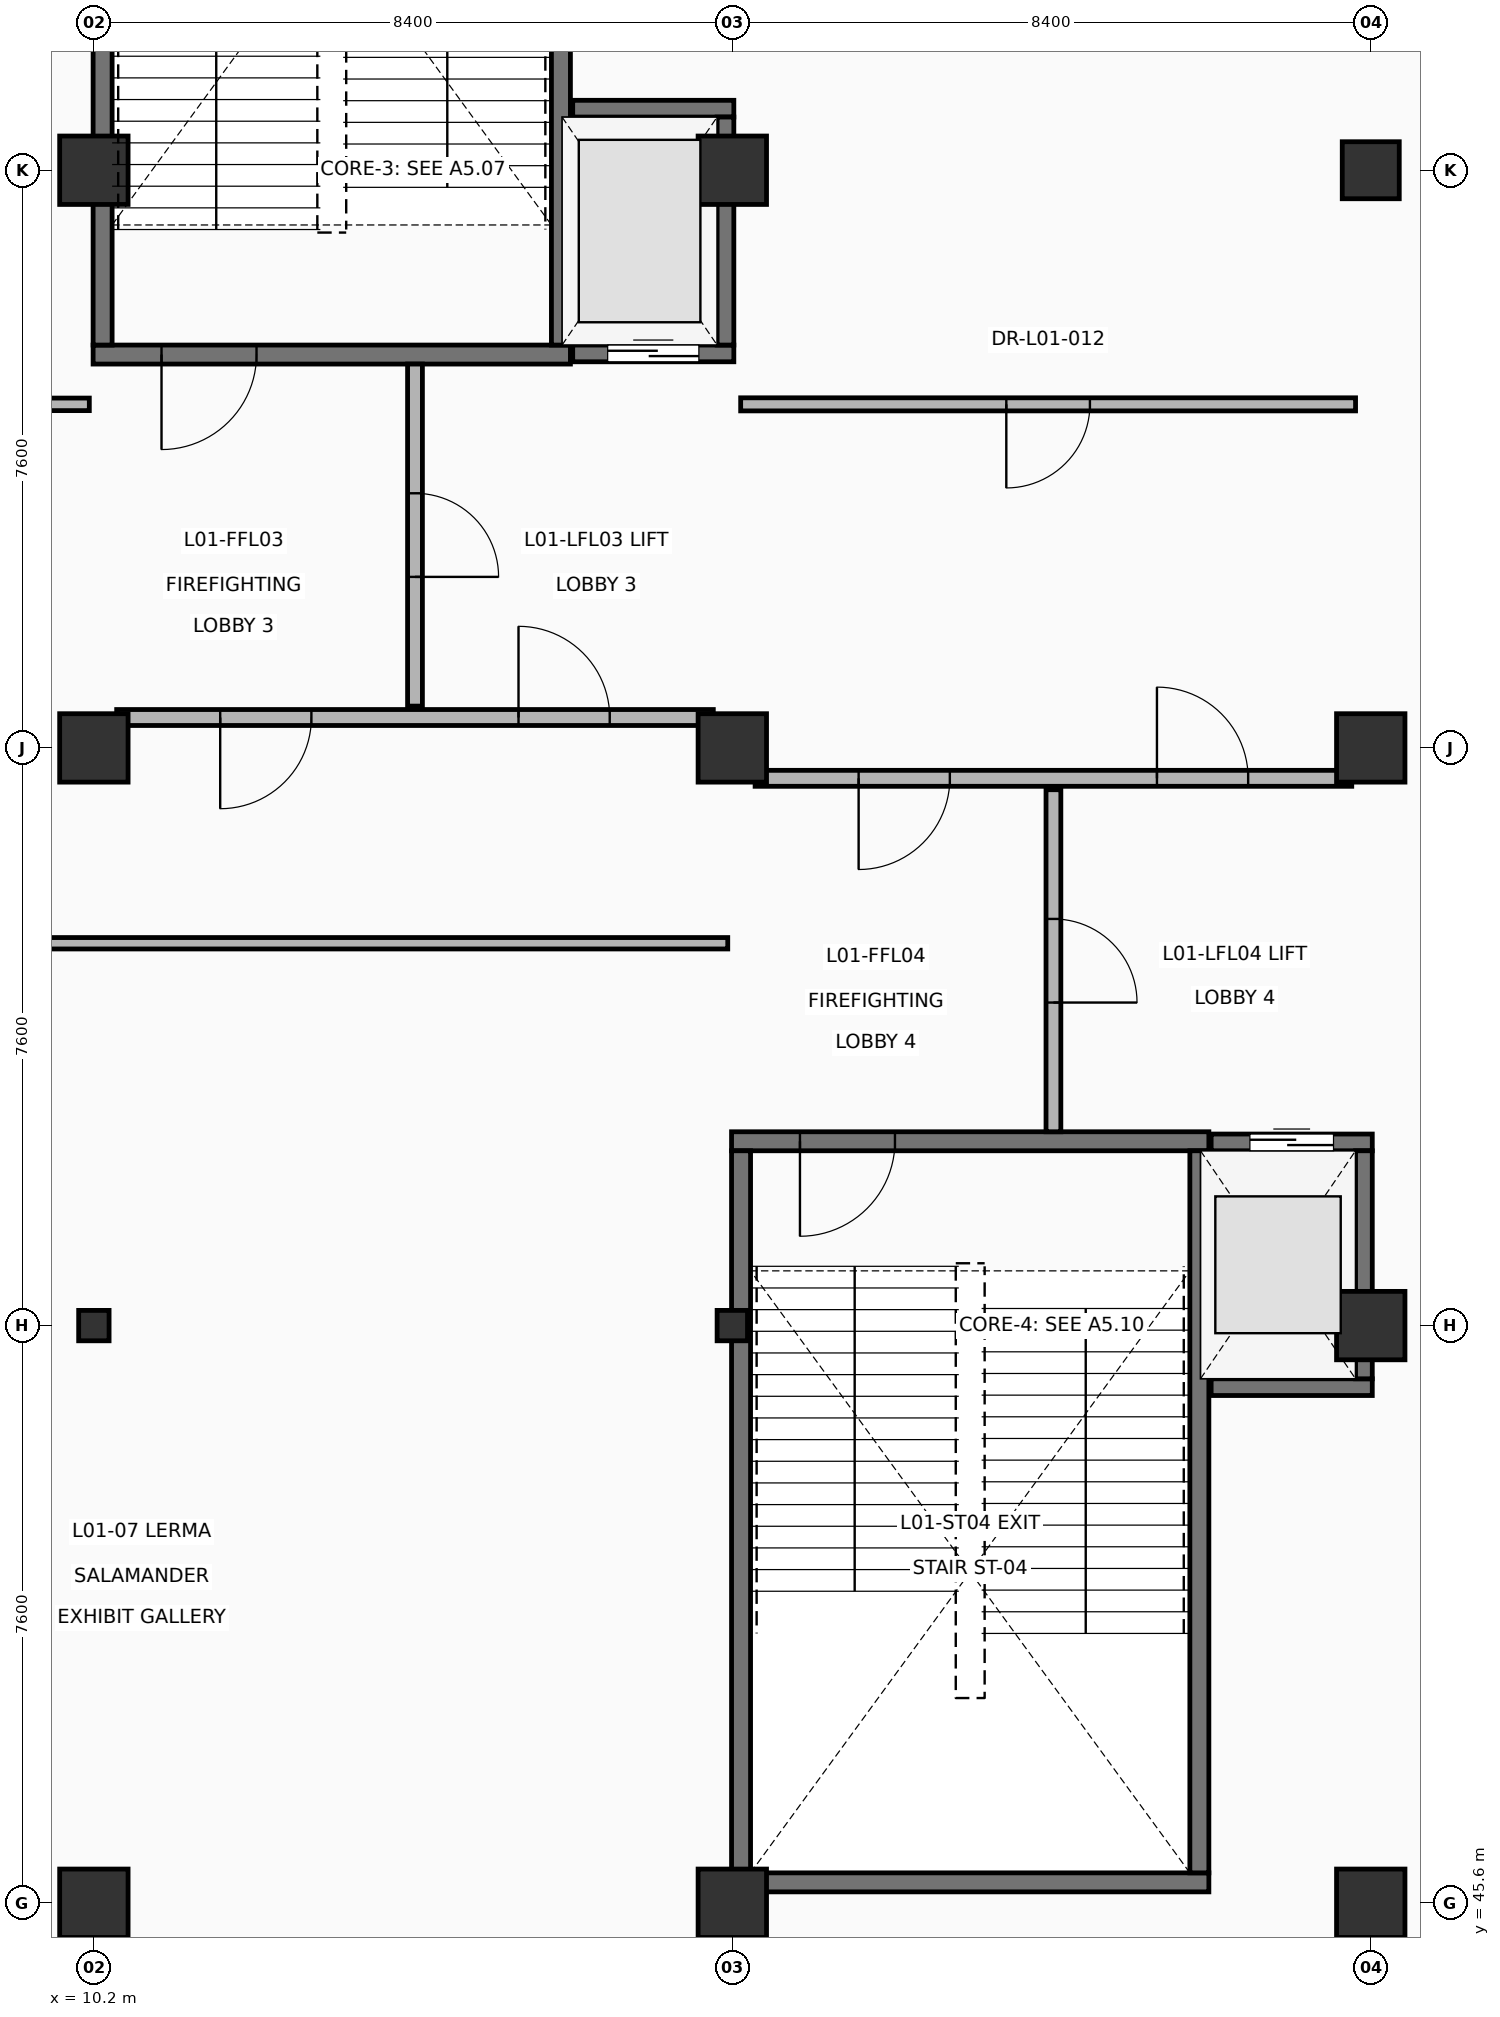
"""IFC4 building model, lengths in metres.
Left out: names, types, materials, properties, quantities, classifications, styles, units other than length and angle.
Written with IfcOpenShell. Run it as: python <this file> out.ifc"""

import sys

from ifc_helpers import new_model, si_unit, direction, frame, frame_2d, origin, origin_2d, place, context, subcontext, project, spatial, rectangle, hollow_rectangle, circle, extrude, element, fill, save


model = new_model("IFC4")
c1 = context("Model", 3, precision=1e-05, world=origin(), true_north=direction((0.0, 1.0)))
c2 = subcontext(c1, "Body", "Model", "MODEL_VIEW")
j1 = project(units=[si_unit("LENGTHUNIT", "METRE"), si_unit("PLANEANGLEUNIT", "RADIAN")], contexts=[c1])
p1 = place(None, origin())
s1 = spatial("IfcSite", under=j1, at=p1, CompositionType="ELEMENT")
p2 = place(p1, origin())
s2 = spatial("IfcBuilding", under=s1, at=p2, CompositionType="ELEMENT")
p3 = place(p2, origin())
s3 = spatial("IfcBuildingStorey", under=s2, at=p3, CompositionType="ELEMENT", Elevation=0.0)
p4 = place(p3, frame((10.2, 45.6, 0.0), z_axis=(0.0, 0.0, 1.0), x_axis=(1.0, 0.0, 0.0)))
e1 = element("IfcColumn", 1, at=p4, inside=s3, PredefinedType="COLUMN", context=c2, shape_type="SweptSolid", body=[
    extrude(rectangle(XDim=0.9, YDim=0.9, at=origin_2d()), origin(), (0.0, 0.0, 1.0), 5.4),
])
p5 = place(p3, frame((10.2, 53.2, 0.0), z_axis=(0.0, 0.0, 1.0), x_axis=(1.0, 0.0, 0.0)))
e2 = element("IfcColumn", 2, at=p5, inside=s3, PredefinedType="COLUMN", context=c2, shape_type="SweptSolid", body=[
    extrude(hollow_rectangle(XDim=0.4, YDim=0.4, WallThickness=0.016, at=origin_2d()), origin(), (0.0, 0.0, 1.0), 5.4),
])
for number, where, z_axis, x_axis in (
    (3, (10.2, 60.8, 0.0), (0.0, 0.0, 1.0), (1.0, 0.0, 0.0)),
    (4, (10.2, 68.4, 0.0), (0.0, 0.0, 1.0), (1.0, 0.0, 0.0)),
    (5, (18.6, 45.6, 0.0), (0.0, 0.0, 1.0), (1.0, 0.0, 0.0)),
):
    element("IfcColumn", number, at=place(p3, frame(where, z_axis=z_axis, x_axis=x_axis)), inside=s3, PredefinedType="COLUMN", context=c2, shape_type="SweptSolid", body=[
        extrude(rectangle(XDim=0.9, YDim=0.9, at=origin_2d()), origin(), (0.0, 0.0, 1.0), 5.4),
    ])
p6 = place(p3, frame((18.6, 53.2, 0.0), z_axis=(0.0, 0.0, 1.0), x_axis=(1.0, 0.0, 0.0)))
e6 = element("IfcColumn", 6, at=p6, inside=s3, PredefinedType="COLUMN", context=c2, shape_type="SweptSolid", body=[
    extrude(hollow_rectangle(XDim=0.4, YDim=0.4, WallThickness=0.016, at=origin_2d()), origin(), (0.0, 0.0, 1.0), 5.4),
])
for number, where, z_axis, x_axis in (
    (7, (18.6, 60.8, 0.0), (0.0, 0.0, 1.0), (1.0, 0.0, 0.0)),
    (8, (18.6, 68.4, 0.0), (0.0, 0.0, 1.0), (1.0, 0.0, 0.0)),
    (9, (27.0, 45.6, 0.0), (0.0, 0.0, 1.0), (1.0, 0.0, 0.0)),
    (10, (27.0, 53.2, 0.0), (0.0, 0.0, 1.0), (1.0, 0.0, 0.0)),
    (11, (27.0, 60.8, 0.0), (0.0, 0.0, 1.0), (1.0, 0.0, 0.0)),
):
    element("IfcColumn", number, at=place(p3, frame(where, z_axis=z_axis, x_axis=x_axis)), inside=s3, PredefinedType="COLUMN", context=c2, shape_type="SweptSolid", body=[
        extrude(rectangle(XDim=0.9, YDim=0.9, at=origin_2d()), origin(), (0.0, 0.0, 1.0), 5.4),
    ])
p7 = place(p3, frame((27.0, 68.4, 0.0), z_axis=(0.0, 0.0, 1.0), x_axis=(1.0, 0.0, 0.0)))
e12 = element("IfcColumn", 12, at=p7, inside=s3, PredefinedType="COLUMN", context=c2, shape_type="SweptSolid", body=[
    extrude(circle(Radius=0.375, at=origin_2d()), origin(), (0.0, 0.0, 1.0), 5.4),
])
p8 = place(p3, frame((10.19, 65.975, 0.0), z_axis=(0.0, 0.0, 1.0), x_axis=(1.0, 0.0, 0.0)))
e13 = element("IfcWall", 13, at=p8, inside=s3, PredefinedType="SHEAR", context=c2, shape_type="SweptSolid", body=[
    extrude(rectangle(XDim=6.28, YDim=0.25, at=frame_2d((3.14, 0.0))), origin(), (0.0, 0.0, 1.0), 5.16),
])
p9 = place(p8, frame((0.9, 0.0, 0.0)))
e14 = element("IfcOpeningElement", 14, at=p9, cuts=e13, PredefinedType="OPENING", context=c2, shape_type="SweptSolid", body=[
    extrude(rectangle(XDim=1.25, YDim=2.2, at=frame_2d((0.625, 1.1))), frame((0.0, 0.135, 0.0), z_axis=(0.0, -1.0, 0.0), x_axis=(1.0, 0.0, 0.0)), (0.0, 0.0, 1.0), 0.27),
])
for number, where, z_axis, x_axis in (
    (15, (10.315, 66.1, 0.0), (0.0, 0.0, 1.0), (0.0, 1.0, 0.0)),
    (16, (16.345, 66.1, 0.0), (0.0, 0.0, 1.0), (0.0, 1.0, 0.0)),
):
    element("IfcWall", number, at=place(p3, frame(where, z_axis=z_axis, x_axis=x_axis)), inside=s3, PredefinedType="SHEAR", context=c2, shape_type="SweptSolid", body=[
        extrude(rectangle(XDim=9.5, YDim=0.25, at=frame_2d((4.75, 0.0))), origin(), (0.0, 0.0, 1.0), 5.16),
    ])
p10 = place(p3, frame((16.5, 65.99, 0.0), z_axis=(0.0, 0.0, 1.0), x_axis=(1.0, 0.0, 0.0)))
e17 = element("IfcWall", 17, at=p10, inside=s3, PredefinedType="SHEAR", context=c2, shape_type="SweptSolid", body=[
    extrude(rectangle(XDim=2.12, YDim=0.22, at=frame_2d((1.06, 0.0))), origin(), (0.0, 0.0, 1.0), 5.16),
])
p11 = place(p10, frame((0.46, 0.0, 0.0)))
e18 = element("IfcOpeningElement", 18, at=p11, cuts=e17, PredefinedType="OPENING", context=c2, shape_type="SweptSolid", body=[
    extrude(rectangle(XDim=1.2, YDim=2.2, at=frame_2d((0.6, 1.1))), frame((0.0, 0.12, 0.0), z_axis=(0.0, -1.0, 0.0), x_axis=(1.0, 0.0, 0.0)), (0.0, 0.0, 1.0), 0.24),
])
p12 = place(p3, frame((16.5, 69.21, 0.0), z_axis=(0.0, 0.0, 1.0), x_axis=(1.0, 0.0, 0.0)))
e19 = element("IfcWall", 19, at=p12, inside=s3, PredefinedType="SHEAR", context=c2, shape_type="SweptSolid", body=[
    extrude(rectangle(XDim=2.12, YDim=0.22, at=frame_2d((1.06, 0.0))), origin(), (0.0, 0.0, 1.0), 5.16),
])
p13 = place(p3, frame((18.51, 66.1, 0.0), z_axis=(0.0, 0.0, 1.0), x_axis=(0.0, 1.0, 0.0)))
e20 = element("IfcWall", 20, at=p13, inside=s3, PredefinedType="SHEAR", context=c2, shape_type="SweptSolid", body=[
    extrude(rectangle(XDim=3.0, YDim=0.22, at=frame_2d((1.5, 0.0))), origin(), (0.0, 0.0, 1.0), 5.16),
])
p14 = place(p3, frame((10.5, 61.2, 0.0), z_axis=(0.0, 0.0, 1.0), x_axis=(1.0, 0.0, 0.0)))
e21 = element("IfcWall", 21, at=p14, inside=s3, PredefinedType="PARTITIONING", context=c2, shape_type="SweptSolid", body=[
    extrude(rectangle(XDim=7.85, YDim=0.21, at=frame_2d((3.925, 0.0))), origin(), (0.0, 0.0, 1.0), 5.16),
])
p15 = place(p14, frame((1.362, 0.0, 0.0)))
e22 = element("IfcOpeningElement", 22, at=p15, cuts=e21, PredefinedType="OPENING", context=c2, shape_type="SweptSolid", body=[
    extrude(rectangle(XDim=1.2, YDim=2.2, at=frame_2d((0.6, 1.1))), frame((0.0, 0.115, 0.0), z_axis=(0.0, -1.0, 0.0), x_axis=(1.0, 0.0, 0.0)), (0.0, 0.0, 1.0), 0.23),
])
p16 = place(p14, frame((5.287, 0.0, 0.0)))
e23 = element("IfcOpeningElement", 23, at=p16, cuts=e21, PredefinedType="OPENING", context=c2, shape_type="SweptSolid", body=[
    extrude(rectangle(XDim=1.2, YDim=2.2, at=frame_2d((0.6, 1.1))), frame((0.0, 0.115, 0.0), z_axis=(0.0, -1.0, 0.0), x_axis=(1.0, 0.0, 0.0)), (0.0, 0.0, 1.0), 0.23),
])
p17 = place(p3, frame((14.425, 61.35, 0.0), z_axis=(0.0, 0.0, 1.0), x_axis=(0.0, 1.0, 0.0)))
e24 = element("IfcWall", 24, at=p17, inside=s3, PredefinedType="PARTITIONING", context=c2, shape_type="SweptSolid", body=[
    extrude(rectangle(XDim=4.5, YDim=0.195, at=frame_2d((2.25, 0.0))), origin(), (0.0, 0.0, 1.0), 5.16),
])
p18 = place(p17, frame((1.7, 0.0, 0.0)))
e25 = element("IfcOpeningElement", 25, at=p18, cuts=e24, PredefinedType="OPENING", context=c2, shape_type="SweptSolid", body=[
    extrude(rectangle(XDim=1.1, YDim=2.15, at=frame_2d((0.55, 1.075))), frame((0.0, 0.107, 0.0), z_axis=(0.0, -1.0, 0.0), x_axis=(1.0, 0.0, 0.0)), (0.0, 0.0, 1.0), 0.215),
])
p19 = place(p3, frame((18.59, 45.875, 0.0), z_axis=(0.0, 0.0, 1.0), x_axis=(1.0, 0.0, 0.0)))
e26 = element("IfcWall", 26, at=p19, inside=s3, PredefinedType="SHEAR", context=c2, shape_type="SweptSolid", body=[
    extrude(rectangle(XDim=6.28, YDim=0.25, at=frame_2d((3.14, 0.0))), origin(), (0.0, 0.0, 1.0), 5.16),
])
p20 = place(p3, frame((18.59, 55.625, 0.0), z_axis=(0.0, 0.0, 1.0), x_axis=(1.0, 0.0, 0.0)))
e27 = element("IfcWall", 27, at=p20, inside=s3, PredefinedType="SHEAR", context=c2, shape_type="SweptSolid", body=[
    extrude(rectangle(XDim=6.28, YDim=0.25, at=frame_2d((3.14, 0.0))), origin(), (0.0, 0.0, 1.0), 5.16),
])
p21 = place(p20, frame((0.9, 0.0, 0.0)))
e28 = element("IfcOpeningElement", 28, at=p21, cuts=e27, PredefinedType="OPENING", context=c2, shape_type="SweptSolid", body=[
    extrude(rectangle(XDim=1.25, YDim=2.2, at=frame_2d((0.625, 1.1))), frame((0.0, 0.135, 0.0), z_axis=(0.0, -1.0, 0.0), x_axis=(1.0, 0.0, 0.0)), (0.0, 0.0, 1.0), 0.27),
])
for number, where, z_axis, x_axis in (
    (29, (18.715, 46.0, 0.0), (0.0, 0.0, 1.0), (0.0, 1.0, 0.0)),
    (30, (24.745, 46.0, 0.0), (0.0, 0.0, 1.0), (0.0, 1.0, 0.0)),
):
    element("IfcWall", number, at=place(p3, frame(where, z_axis=z_axis, x_axis=x_axis)), inside=s3, PredefinedType="SHEAR", context=c2, shape_type="SweptSolid", body=[
        extrude(rectangle(XDim=9.5, YDim=0.25, at=frame_2d((4.75, 0.0))), origin(), (0.0, 0.0, 1.0), 5.16),
    ])
p22 = place(p3, frame((24.9, 52.39, 0.0), z_axis=(0.0, 0.0, 1.0), x_axis=(1.0, 0.0, 0.0)))
e31 = element("IfcWall", 31, at=p22, inside=s3, PredefinedType="SHEAR", context=c2, shape_type="SweptSolid", body=[
    extrude(rectangle(XDim=2.12, YDim=0.22, at=frame_2d((1.06, 0.0))), origin(), (0.0, 0.0, 1.0), 5.16),
])
p23 = place(p3, frame((24.9, 55.61, 0.0), z_axis=(0.0, 0.0, 1.0), x_axis=(1.0, 0.0, 0.0)))
e32 = element("IfcWall", 32, at=p23, inside=s3, PredefinedType="SHEAR", context=c2, shape_type="SweptSolid", body=[
    extrude(rectangle(XDim=2.12, YDim=0.22, at=frame_2d((1.06, 0.0))), origin(), (0.0, 0.0, 1.0), 5.16),
])
p24 = place(p23, frame((0.51, 0.0, 0.0)))
e33 = element("IfcOpeningElement", 33, at=p24, cuts=e32, PredefinedType="OPENING", context=c2, shape_type="SweptSolid", body=[
    extrude(rectangle(XDim=1.1, YDim=2.15, at=frame_2d((0.55, 1.075))), frame((0.0, 0.12, 0.0), z_axis=(0.0, -1.0, 0.0), x_axis=(1.0, 0.0, 0.0)), (0.0, 0.0, 1.0), 0.24),
])
p25 = place(p3, frame((26.91, 52.5, 0.0), z_axis=(0.0, 0.0, 1.0), x_axis=(0.0, 1.0, 0.0)))
e34 = element("IfcWall", 34, at=p25, inside=s3, PredefinedType="SHEAR", context=c2, shape_type="SweptSolid", body=[
    extrude(rectangle(XDim=3.0, YDim=0.22, at=frame_2d((1.5, 0.0))), origin(), (0.0, 0.0, 1.0), 5.16),
])
p26 = place(p3, frame((18.9, 60.4, 0.0), z_axis=(0.0, 0.0, 1.0), x_axis=(1.0, 0.0, 0.0)))
e35 = element("IfcWall", 35, at=p26, inside=s3, PredefinedType="PARTITIONING", context=c2, shape_type="SweptSolid", body=[
    extrude(rectangle(XDim=7.85, YDim=0.21, at=frame_2d((3.925, 0.0))), origin(), (0.0, 0.0, 1.0), 5.16),
])
p27 = place(p26, frame((1.362, 0.0, 0.0)))
e36 = element("IfcOpeningElement", 36, at=p27, cuts=e35, PredefinedType="OPENING", context=c2, shape_type="SweptSolid", body=[
    extrude(rectangle(XDim=1.2, YDim=2.2, at=frame_2d((0.6, 1.1))), frame((0.0, 0.115, 0.0), z_axis=(0.0, -1.0, 0.0), x_axis=(1.0, 0.0, 0.0)), (0.0, 0.0, 1.0), 0.23),
])
p28 = place(p26, frame((5.287, 0.0, 0.0)))
e37 = element("IfcOpeningElement", 37, at=p28, cuts=e35, PredefinedType="OPENING", context=c2, shape_type="SweptSolid", body=[
    extrude(rectangle(XDim=1.2, YDim=2.2, at=frame_2d((0.6, 1.1))), frame((0.0, 0.115, 0.0), z_axis=(0.0, -1.0, 0.0), x_axis=(1.0, 0.0, 0.0)), (0.0, 0.0, 1.0), 0.23),
])
p29 = place(p3, frame((22.825, 55.75, 0.0), z_axis=(0.0, 0.0, 1.0), x_axis=(0.0, 1.0, 0.0)))
e38 = element("IfcWall", 38, at=p29, inside=s3, PredefinedType="PARTITIONING", context=c2, shape_type="SweptSolid", body=[
    extrude(rectangle(XDim=4.5, YDim=0.195, at=frame_2d((2.25, 0.0))), origin(), (0.0, 0.0, 1.0), 5.16),
])
p30 = place(p29, frame((1.7, 0.0, 0.0)))
e39 = element("IfcOpeningElement", 39, at=p30, cuts=e38, PredefinedType="OPENING", context=c2, shape_type="SweptSolid", body=[
    extrude(rectangle(XDim=1.1, YDim=2.15, at=frame_2d((0.55, 1.075))), frame((0.0, 0.107, 0.0), z_axis=(0.0, -1.0, 0.0), x_axis=(1.0, 0.0, 0.0)), (0.0, 0.0, 1.0), 0.215),
])
p31 = place(p3, frame((18.71, 65.32, 0.0), z_axis=(0.0, 0.0, 1.0), x_axis=(1.0, 0.0, 0.0)))
e40 = element("IfcWall", 40, at=p31, inside=s3, PredefinedType="PARTITIONING", context=c2, shape_type="SweptSolid", body=[
    extrude(rectangle(XDim=8.09, YDim=0.172, at=frame_2d((4.045, 0.0))), origin(), (0.0, 0.0, 1.0), 4.462),
])
p32 = place(p31, frame((3.495, 0.0, 0.0)))
e41 = element("IfcOpeningElement", 41, at=p32, cuts=e40, PredefinedType="OPENING", context=c2, shape_type="SweptSolid", body=[
    extrude(rectangle(XDim=1.1, YDim=2.15, at=frame_2d((0.55, 1.075))), frame((0.0, 0.096, 0.0), z_axis=(0.0, -1.0, 0.0), x_axis=(1.0, 0.0, 0.0)), (0.0, 0.0, 1.0), 0.192),
])
p33 = place(p3, frame((3.425, 65.32, 0.0), z_axis=(0.0, 0.0, 1.0), x_axis=(1.0, 0.0, 0.0)))
e42 = element("IfcWall", 42, at=p33, inside=s3, PredefinedType="PARTITIONING", context=c2, shape_type="SweptSolid", body=[
    extrude(rectangle(XDim=6.715, YDim=0.165, at=frame_2d((3.357, 0.0))), origin(), (0.0, 0.0, 1.0), 4.462),
])
p34 = place(p3, frame((18.54, 58.23, 0.0), z_axis=(0.0, 0.0, 1.0), x_axis=(-1.0, 0.0, 0.0)))
e43 = element("IfcWall", 43, at=p34, inside=s3, PredefinedType="PARTITIONING", context=c2, shape_type="SweptSolid", body=[
    extrude(rectangle(XDim=15.1, YDim=0.15, at=frame_2d((7.55, 0.0))), origin(), (0.0, 0.0, 1.0), 4.462),
])
p35 = place(p9, origin())
e44 = element("IfcDoor", 44, at=p35, inside=s3, OperationType="SINGLE_SWING_RIGHT", PredefinedType="DOOR", context=c2, shape_type="SweptSolid", body=[
    extrude(rectangle(XDim=1.25, YDim=2.2, at=frame_2d((0.625, 1.1))), frame((0.0, 0.025, 0.0), z_axis=(0.0, -1.0, 0.0), x_axis=(1.0, 0.0, 0.0)), (0.0, 0.0, 1.0), 0.05),
])
fill(e14, e44)
p36 = place(p11, origin())
e45 = element("IfcDoor", 45, at=p36, inside=s3, OperationType="DOUBLE_DOOR_SLIDING", PredefinedType="DOOR", context=c2, shape_type="SweptSolid", body=[
    extrude(rectangle(XDim=1.2, YDim=2.2, at=frame_2d((0.6, 1.1))), frame((0.0, 0.025, 0.0), z_axis=(0.0, -1.0, 0.0), x_axis=(1.0, 0.0, 0.0)), (0.0, 0.0, 1.0), 0.05),
])
fill(e18, e45)
p37 = place(p15, origin())
e46 = element("IfcDoor", 46, at=p37, inside=s3, OperationType="SINGLE_SWING_RIGHT", PredefinedType="DOOR", context=c2, shape_type="SweptSolid", body=[
    extrude(rectangle(XDim=1.2, YDim=2.2, at=frame_2d((0.6, 1.1))), frame((0.0, 0.025, 0.0), z_axis=(0.0, -1.0, 0.0), x_axis=(1.0, 0.0, 0.0)), (0.0, 0.0, 1.0), 0.05),
])
fill(e22, e46)
p38 = place(p16, origin())
e47 = element("IfcDoor", 47, at=p38, inside=s3, OperationType="SINGLE_SWING_LEFT", PredefinedType="DOOR", context=c2, shape_type="SweptSolid", body=[
    extrude(rectangle(XDim=1.2, YDim=2.2, at=frame_2d((0.6, 1.1))), frame((0.0, 0.025, 0.0), z_axis=(0.0, -1.0, 0.0), x_axis=(1.0, 0.0, 0.0)), (0.0, 0.0, 1.0), 0.05),
])
fill(e23, e47)
p39 = place(p18, origin())
e48 = element("IfcDoor", 48, at=p39, inside=s3, OperationType="SINGLE_SWING_RIGHT", PredefinedType="DOOR", context=c2, shape_type="SweptSolid", body=[
    extrude(rectangle(XDim=1.1, YDim=2.15, at=frame_2d((0.55, 1.075))), frame((0.0, 0.025, 0.0), z_axis=(0.0, -1.0, 0.0), x_axis=(1.0, 0.0, 0.0)), (0.0, 0.0, 1.0), 0.05),
])
fill(e25, e48)
p40 = place(p21, origin())
e49 = element("IfcDoor", 49, at=p40, inside=s3, OperationType="SINGLE_SWING_RIGHT", PredefinedType="DOOR", context=c2, shape_type="SweptSolid", body=[
    extrude(rectangle(XDim=1.25, YDim=2.2, at=frame_2d((0.625, 1.1))), frame((0.0, 0.025, 0.0), z_axis=(0.0, -1.0, 0.0), x_axis=(1.0, 0.0, 0.0)), (0.0, 0.0, 1.0), 0.05),
])
fill(e28, e49)
p41 = place(p24, origin())
e50 = element("IfcDoor", 50, at=p41, inside=s3, OperationType="DOUBLE_DOOR_SLIDING", PredefinedType="DOOR", context=c2, shape_type="SweptSolid", body=[
    extrude(rectangle(XDim=1.1, YDim=2.15, at=frame_2d((0.55, 1.075))), frame((0.0, 0.025, 0.0), z_axis=(0.0, -1.0, 0.0), x_axis=(1.0, 0.0, 0.0)), (0.0, 0.0, 1.0), 0.05),
])
fill(e33, e50)
p42 = place(p27, origin())
e51 = element("IfcDoor", 51, at=p42, inside=s3, OperationType="SINGLE_SWING_RIGHT", PredefinedType="DOOR", context=c2, shape_type="SweptSolid", body=[
    extrude(rectangle(XDim=1.2, YDim=2.2, at=frame_2d((0.6, 1.1))), frame((0.0, 0.025, 0.0), z_axis=(0.0, -1.0, 0.0), x_axis=(1.0, 0.0, 0.0)), (0.0, 0.0, 1.0), 0.05),
])
fill(e36, e51)
p43 = place(p28, origin())
e52 = element("IfcDoor", 52, at=p43, inside=s3, OperationType="SINGLE_SWING_LEFT", PredefinedType="DOOR", context=c2, shape_type="SweptSolid", body=[
    extrude(rectangle(XDim=1.2, YDim=2.2, at=frame_2d((0.6, 1.1))), frame((0.0, 0.025, 0.0), z_axis=(0.0, -1.0, 0.0), x_axis=(1.0, 0.0, 0.0)), (0.0, 0.0, 1.0), 0.05),
])
fill(e37, e52)
p44 = place(p30, origin())
e53 = element("IfcDoor", 53, at=p44, inside=s3, OperationType="SINGLE_SWING_RIGHT", PredefinedType="DOOR", context=c2, shape_type="SweptSolid", body=[
    extrude(rectangle(XDim=1.1, YDim=2.15, at=frame_2d((0.55, 1.075))), frame((0.0, 0.025, 0.0), z_axis=(0.0, -1.0, 0.0), x_axis=(1.0, 0.0, 0.0)), (0.0, 0.0, 1.0), 0.05),
])
fill(e39, e53)
p45 = place(p32, origin())
e54 = element("IfcDoor", 54, at=p45, inside=s3, OperationType="SINGLE_SWING_RIGHT", PredefinedType="DOOR", context=c2, shape_type="SweptSolid", body=[
    extrude(rectangle(XDim=1.1, YDim=2.15, at=frame_2d((0.55, 1.075))), frame((0.0, 0.025, 0.0), z_axis=(0.0, -1.0, 0.0), x_axis=(1.0, 0.0, 0.0)), (0.0, 0.0, 1.0), 0.05),
])
fill(e41, e54)
save(model, sys.argv[1])
